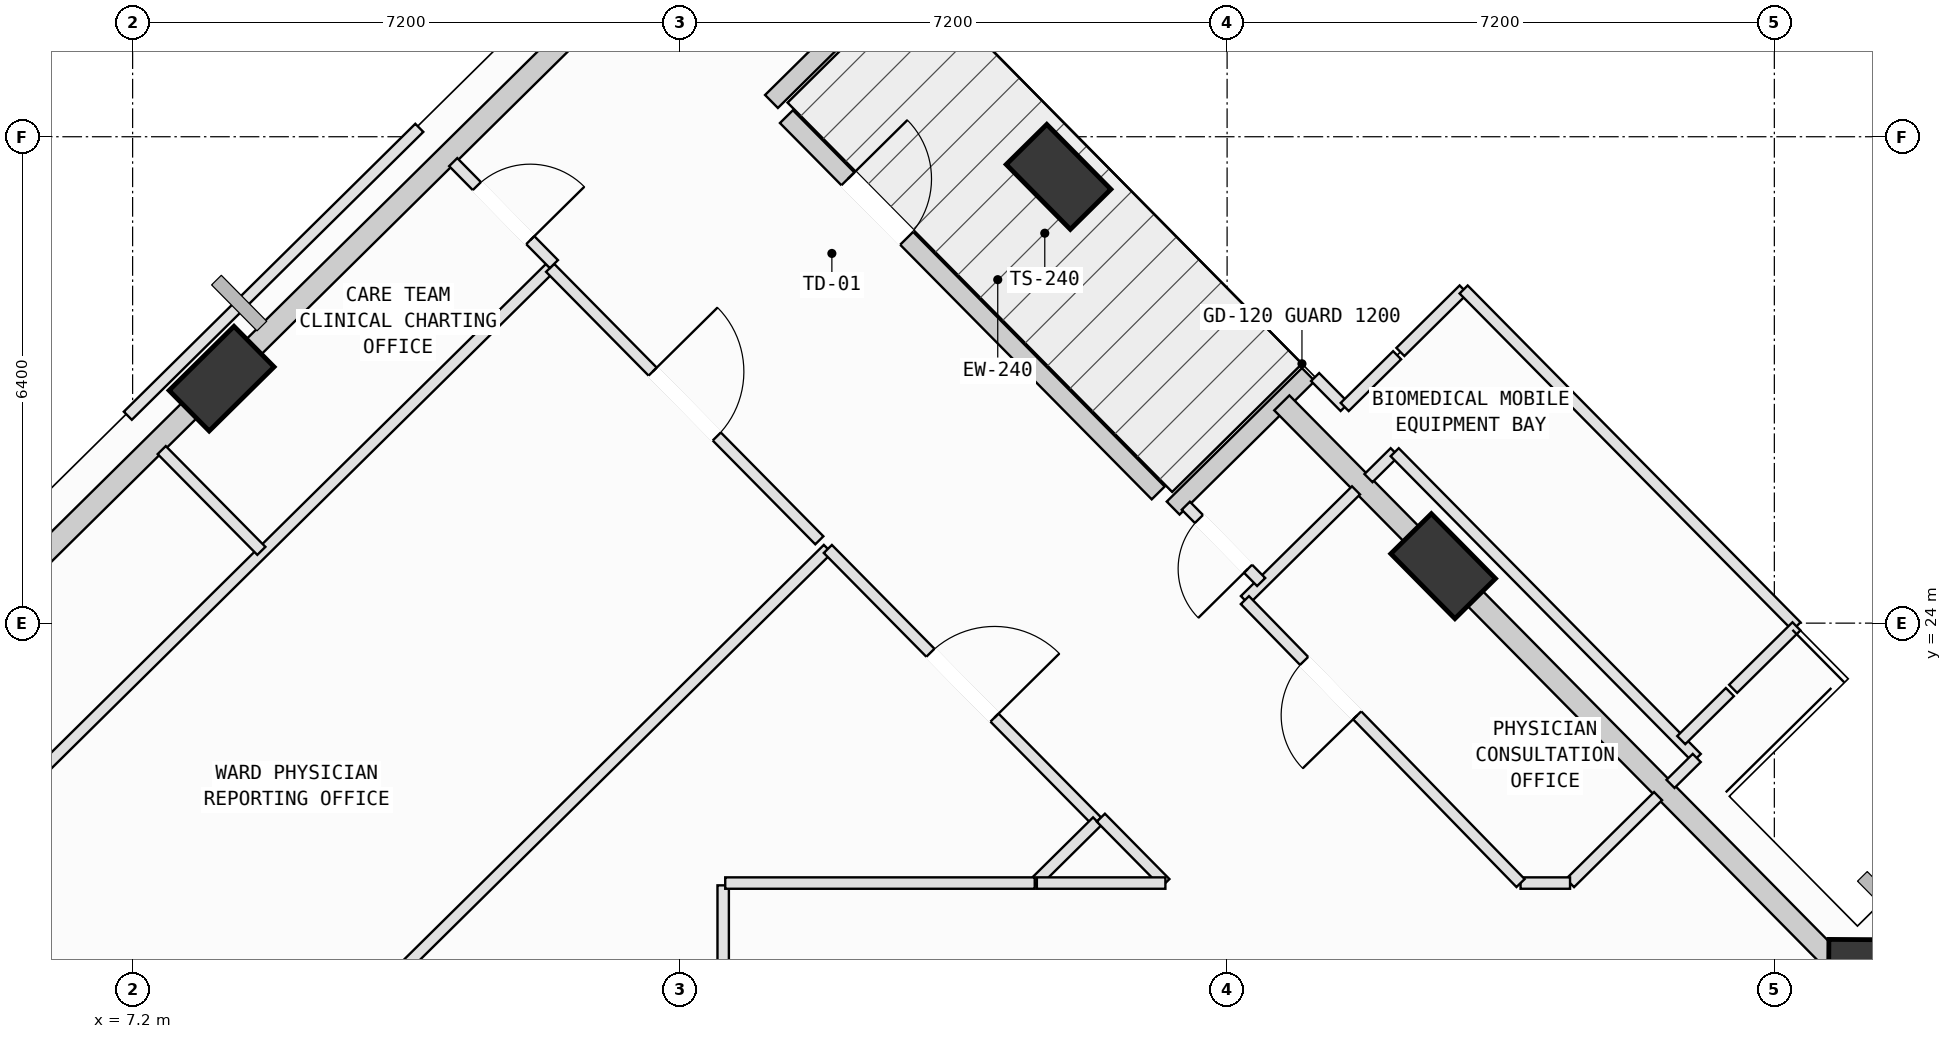
"""IFC4 building model, lengths in metres.
Left out: names, types, materials, properties, quantities, classifications, styles, units other than length and angle.
Written with IfcOpenShell. Run it as: python <this file> out.ifc"""

import sys

from ifc_helpers import new_model, si_unit, direction, frame, frame_2d, origin, origin_2d, place, context, subcontext, project, spatial, rectangle, extrude, element, fill, save


model = new_model("IFC4")
c1 = context("Model", 3, precision=1e-05, world=origin(), true_north=direction((0.0, 1.0)))
c2 = subcontext(c1, "Body", "Model", "MODEL_VIEW")
j1 = project(units=[si_unit("LENGTHUNIT", "METRE"), si_unit("PLANEANGLEUNIT", "RADIAN")], contexts=[c1])
p1 = place(None, origin())
s1 = spatial("IfcSite", under=j1, at=p1, CompositionType="ELEMENT")
p2 = place(p1, origin())
s2 = spatial("IfcBuilding", under=s1, at=p2, CompositionType="ELEMENT")
p3 = place(p2, frame((0.0, 0.0, 215.2)))
s3 = spatial("IfcBuildingStorey", under=s2, at=p3, CompositionType="ELEMENT", Elevation=215.2)
p4 = place(p3, frame((29.889, 19.236, 0.002), z_axis=(0.023205698391, -0.015144771581, 0.999615991997), x_axis=(-0.83375940471, 0.551432149195, 0.027709924051)))
e1 = element("IfcColumn", 1, at=p4, inside=s3, PredefinedType="COLUMN", context=c2, shape_type="SweptSolid", body=[
    extrude(rectangle(XDim=1.2, YDim=0.75, at=origin_2d()), origin(), (0.0, 0.0, 1.0), 3.998),
])
p5 = place(p3, frame((24.442, 24.75, 0.002), z_axis=(0.000549424458, -0.037910287634, 0.999280995628), x_axis=(-0.713002190579, 0.700642811583, 0.026972704851)))
e2 = element("IfcColumn", 2, at=p5, inside=s3, PredefinedType="COLUMN", context=c2, shape_type="SweptSolid", body=[
    extrude(rectangle(XDim=1.2, YDim=0.75, at=origin_2d()), origin(), (0.0, 0.0, 1.0), 3.999),
])
p6 = place(p3, frame((19.383, 29.872, 0.002), z_axis=(-0.020547526902, -0.058959817551, 0.998048866064), x_axis=(-0.429967743236, 0.90175090549, 0.044418962437)))
e3 = element("IfcColumn", 3, at=p6, inside=s3, PredefinedType="COLUMN", context=c2, shape_type="SweptSolid", body=[
    extrude(rectangle(XDim=1.2, YDim=0.75, at=origin_2d()), origin(), (0.0, 0.0, 1.0), 4.004),
])
p7 = place(p3, frame((8.371, 27.217, 0.002), z_axis=(-0.009113457738, -0.104136443749, 0.994521264716), x_axis=(0.769637431424, 0.634240685776, 0.073464118158)))
e4 = element("IfcColumn", 4, at=p7, inside=s3, PredefinedType="COLUMN", context=c2, shape_type="SweptSolid", body=[
    extrude(rectangle(XDim=1.2, YDim=0.75, at=origin_2d()), origin(), (0.0, 0.0, 1.0), 4.018),
])
p8 = place(p3, frame((15.802, 30.665, 0.0), z_axis=(0.0, 0.0, 1.0), x_axis=(0.702761539953, -0.711425483071, 0.0)))
e5 = element("IfcWall", 5, at=p8, inside=s3, PredefinedType="SOLIDWALL", context=c2, shape_type="SweptSolid", body=[
    extrude(rectangle(XDim=6.96, YDim=0.24, at=frame_2d((3.48, 0.0))), origin(), (0.0, 0.0, 1.0), 3.265),
])
p9 = place(p8, frame((1.151, 0.0, 0.0)))
e6 = element("IfcOpeningElement", 6, at=p9, cuts=e5, PredefinedType="OPENING", context=c2, shape_type="SweptSolid", body=[
    extrude(rectangle(XDim=1.1, YDim=2.15, at=frame_2d((0.55, 1.075))), frame((0.0, 0.13, 0.0), z_axis=(0.0, -1.0, 0.0), x_axis=(1.0, 0.0, 0.0)), (0.0, 0.0, 1.0), 0.26),
])
p10 = place(p3, frame((20.89, 25.514, 0.0), z_axis=(0.0, 0.0, 1.0), x_axis=(0.71139038819, 0.702797065725, 0.0)))
e7 = element("IfcWall", 7, at=p10, inside=s3, PredefinedType="SOLIDWALL", context=c2, shape_type="SweptSolid", body=[
    extrude(rectangle(XDim=2.5, YDim=0.24, at=frame_2d((1.25, 0.0))), origin(), (0.0, 0.0, 1.0), 3.265),
])
p11 = place(p3, frame((17.384, 32.621, 0.0), z_axis=(0.0, 0.0, 1.0), x_axis=(-0.711439211914, -0.702747641583, 0.0)))
e8 = element("IfcWall", 8, at=p11, inside=s3, PredefinedType="SOLIDWALL", context=c2, shape_type="SweptSolid", body=[
    extrude(rectangle(XDim=2.5, YDim=0.24, at=frame_2d((1.25, 0.0))), origin(), (0.0, 0.0, 1.0), 3.265),
])
p12 = place(p3, frame((30.177, 19.521, 0.0), z_axis=(0.0, 0.0, 1.0), x_axis=(0.711415033641, 0.702772118051, 0.0)))
e9 = element("IfcWall", 9, at=p12, inside=s3, PredefinedType="SOLIDWALL", context=c2, shape_type="SweptSolid", body=[
    extrude(rectangle(XDim=6.158, YDim=0.28, at=frame_2d((3.079, 0.0))), origin(), (0.0, 0.0, 1.0), 3.165),
])
p13 = place(p12, frame((3.587, 0.0, 0.75)))
e10 = element("IfcOpeningElement", 10, at=p13, cuts=e9, PredefinedType="OPENING", context=c2, shape_type="SweptSolid", body=[
    extrude(rectangle(XDim=1.4, YDim=1.85, at=frame_2d((0.7, 0.925))), frame((0.0, 0.15, 0.0), z_axis=(0.0, -1.0, 0.0), x_axis=(1.0, 0.0, 0.0)), (0.0, 0.0, 1.0), 0.3),
])
p14 = place(p3, frame((24.758, 24.431, 0.0), z_axis=(0.0, 0.0, 1.0), x_axis=(0.702777784816, -0.711409435676, 0.0)))
e11 = element("IfcWall", 11, at=p14, inside=s3, PredefinedType="SOLIDWALL", context=c2, shape_type="SweptSolid", body=[
    extrude(rectangle(XDim=6.958, YDim=0.28, at=frame_2d((3.479, 0.0))), origin(), (0.0, 0.0, 1.0), 3.245),
])
p15 = place(p3, frame((22.32, 26.898, 0.0), z_axis=(0.0, 0.0, 1.0), x_axis=(0.702813375799, -0.711374274765, 0.0)))
e12 = element("IfcWall", 12, at=p15, inside=s3, PredefinedType="SOLIDWALL", context=c2, shape_type="SweptSolid", body=[
    extrude(rectangle(XDim=2.681, YDim=0.28, at=frame_2d((1.34, 0.0))), origin(), (0.0, 0.0, 1.0), 3.245),
])
p16 = place(p3, frame((8.522, 27.367, 0.0), z_axis=(0.0, 0.0, 1.0), x_axis=(0.711412048905, 0.702775139481, 0.0)))
e13 = element("IfcWall", 13, at=p16, inside=s3, PredefinedType="SOLIDWALL", context=c2, shape_type="SweptSolid", body=[
    extrude(rectangle(XDim=7.434, YDim=0.28, at=frame_2d((3.717, 0.0))), origin(), (0.0, 0.0, 1.0), 3.265),
])
p17 = place(p3, frame((2.666, 21.582, 0.0), z_axis=(0.0, 0.0, 1.0), x_axis=(0.711415560766, 0.702771584443, 0.0)))
e14 = element("IfcWall", 14, at=p17, inside=s3, PredefinedType="SOLIDWALL", context=c2, shape_type="SweptSolid", body=[
    extrude(rectangle(XDim=7.485, YDim=0.28, at=frame_2d((3.742, 0.0))), origin(), (0.0, 0.0, 1.0), 3.265),
])
p18 = place(p3, frame((14.97, 20.55, 0.0), z_axis=(0.0, 0.0, 1.0), x_axis=(0.0, -1.0, 0.0)))
e15 = element("IfcWall", 15, at=p18, inside=s3, PredefinedType="PARTITIONING", context=c2, shape_type="SweptSolid", body=[
    extrude(rectangle(XDim=2.32, YDim=0.15, at=frame_2d((1.16, 0.0))), origin(), (0.0, 0.0, 1.0), 3.78),
])
p19 = place(p3, frame((5.544, 14.305, 0.0), z_axis=(0.0, 0.0, 1.0), x_axis=(0.711434510245, 0.702752401371, 0.0)))
e16 = element("IfcWall", 16, at=p19, inside=s3, PredefinedType="PARTITIONING", context=c2, shape_type="SweptSolid", body=[
    extrude(rectangle(XDim=15.185, YDim=0.15, at=frame_2d((7.592, 0.0))), origin(), (0.0, 0.0, 1.0), 3.78),
])
p20 = place(p3, frame((16.347, 24.976, 0.0), z_axis=(0.0, 0.0, 1.0), x_axis=(0.702830826081, -0.711357034062, 0.0)))
e17 = element("IfcWall", 17, at=p20, inside=s3, PredefinedType="PARTITIONING", context=c2, shape_type="SweptSolid", body=[
    extrude(rectangle(XDim=5.04, YDim=0.15, at=frame_2d((2.52, 0.0))), origin(), (0.0, 0.0, 1.0), 3.78),
])
p21 = place(p20, frame((1.92, 0.0, 0.0)))
e18 = element("IfcOpeningElement", 18, at=p21, cuts=e17, PredefinedType="OPENING", context=c2, shape_type="SweptSolid", body=[
    extrude(rectangle(XDim=1.2, YDim=2.15, at=frame_2d((0.6, 1.075))), frame((0.0, 0.085, 0.0), z_axis=(0.0, -1.0, 0.0), x_axis=(1.0, 0.0, 0.0)), (0.0, 0.0, 1.0), 0.17),
])
p22 = place(p3, frame((19.889, 21.391, 0.0), z_axis=(0.0, 0.0, 1.0), x_axis=(-0.710907212679, -0.703285813138, 0.0)))
e19 = element("IfcWall", 19, at=p22, inside=s3, PredefinedType="PARTITIONING", context=c2, shape_type="SweptSolid", body=[
    extrude(rectangle(XDim=1.153, YDim=0.15, at=frame_2d((0.577, 0.0))), origin(), (0.0, 0.0, 1.0), 3.78),
])
p23 = place(p3, frame((19.069, 20.58, 0.0), z_axis=(0.0, 0.0, 1.0), x_axis=(-1.0, 0.0, 0.0)))
e20 = element("IfcWall", 20, at=p23, inside=s3, PredefinedType="PARTITIONING", context=c2, shape_type="SweptSolid", body=[
    extrude(rectangle(XDim=4.072, YDim=0.15, at=frame_2d((2.036, 0.0))), origin(), (0.0, 0.0, 1.0), 3.78),
])
p24 = place(p3, frame((3.038, 19.138, 0.0), z_axis=(0.0, 0.0, 1.0), x_axis=(0.71143794273, 0.702748926462, 0.0)))
e21 = element("IfcWall", 21, at=p24, inside=s3, PredefinedType="PARTITIONING", context=c2, shape_type="SweptSolid", body=[
    extrude(rectangle(XDim=13.571, YDim=0.15, at=frame_2d((6.786, 0.0))), origin(), (0.0, 0.0, 1.0), 3.78),
])
p25 = place(p3, frame((12.693, 28.675, 0.0), z_axis=(0.0, 0.0, 1.0), x_axis=(0.702830826081, -0.711357034062, 0.0)))
e22 = element("IfcWall", 22, at=p25, inside=s3, PredefinedType="PARTITIONING", context=c2, shape_type="SweptSolid", body=[
    extrude(rectangle(XDim=5.04, YDim=0.15, at=frame_2d((2.52, 0.0))), origin(), (0.0, 0.0, 1.0), 3.78),
])
p26 = place(p25, frame((1.92, 0.0, 0.0)))
e23 = element("IfcOpeningElement", 23, at=p26, cuts=e22, PredefinedType="OPENING", context=c2, shape_type="SweptSolid", body=[
    extrude(rectangle(XDim=1.2, YDim=2.15, at=frame_2d((0.6, 1.075))), frame((0.0, 0.085, 0.0), z_axis=(0.0, -1.0, 0.0), x_axis=(1.0, 0.0, 0.0)), (0.0, 0.0, 1.0), 0.17),
])
p27 = place(p3, frame((21.834, 24.303, 0.0), z_axis=(0.0, 0.0, 1.0), x_axis=(0.711430022563, 0.702756944466, 0.0)))
e24 = element("IfcWall", 24, at=p27, inside=s3, PredefinedType="PARTITIONING", context=c2, shape_type="SweptSolid", body=[
    extrude(rectangle(XDim=2.055, YDim=0.15, at=frame_2d((1.027, 0.0))), origin(), (0.0, 0.0, 1.0), 3.78),
])
p28 = place(p3, frame((23.46, 25.908, 0.0), z_axis=(0.0, 0.0, 1.0), x_axis=(0.711121484403, 0.70306915337, 0.0)))
e25 = element("IfcWall", 25, at=p28, inside=s3, PredefinedType="PARTITIONING", context=c2, shape_type="SweptSolid", body=[
    extrude(rectangle(XDim=0.485, YDim=0.15, at=frame_2d((0.243, 0.0))), origin(), (0.0, 0.0, 1.0), 3.78),
])
p29 = place(p3, frame((23.805, 26.249, 0.0), z_axis=(0.0, 0.0, 1.0), x_axis=(0.702776263114, -0.711410938911, 0.0)))
e26 = element("IfcWall", 26, at=p29, inside=s3, PredefinedType="PARTITIONING", context=c2, shape_type="SweptSolid", body=[
    extrude(rectangle(XDim=5.655, YDim=0.15, at=frame_2d((2.827, 0.0))), origin(), (0.0, 0.0, 1.0), 3.78),
])
p30 = place(p3, frame((27.779, 22.226, 0.0), z_axis=(0.0, 0.0, 1.0), x_axis=(-0.711121484403, -0.70306915337, 0.0)))
e27 = element("IfcWall", 27, at=p30, inside=s3, PredefinedType="PARTITIONING", context=c2, shape_type="SweptSolid", body=[
    extrude(rectangle(XDim=0.485, YDim=0.15, at=frame_2d((0.243, 0.0))), origin(), (0.0, 0.0, 1.0), 3.78),
])
p31 = place(p3, frame((27.27, 21.724, 0.0), z_axis=(0.0, 0.0, 1.0), x_axis=(-0.711368370717, -0.702819351714, 0.0)))
e28 = element("IfcWall", 28, at=p31, inside=s3, PredefinedType="PARTITIONING", context=c2, shape_type="SweptSolid", body=[
    extrude(rectangle(XDim=1.628, YDim=0.15, at=frame_2d((0.814, 0.0))), origin(), (0.0, 0.0, 1.0), 3.78),
])
p32 = place(p3, frame((26.112, 20.58, 0.0), z_axis=(0.0, 0.0, 1.0), x_axis=(-1.0, 0.0, 0.0)))
e29 = element("IfcWall", 29, at=p32, inside=s3, PredefinedType="PARTITIONING", context=c2, shape_type="SweptSolid", body=[
    extrude(rectangle(XDim=0.651, YDim=0.15, at=frame_2d((0.326, 0.0))), origin(), (0.0, 0.0, 1.0), 3.78),
])
p33 = place(p3, frame((25.461, 20.58, 0.0), z_axis=(0.0, 0.0, 1.0), x_axis=(-0.69781653345, 0.716276542715, 0.0)))
e30 = element("IfcWall", 30, at=p33, inside=s3, PredefinedType="PARTITIONING", context=c2, shape_type="SweptSolid", body=[
    extrude(rectangle(XDim=5.198, YDim=0.15, at=frame_2d((2.599, 0.0))), origin(), (0.0, 0.0, 1.0), 3.78),
])
p34 = place(p33, frame((3.081, 0.0, 0.0)))
e31 = element("IfcOpeningElement", 31, at=p34, cuts=e30, PredefinedType="OPENING", context=c2, shape_type="SweptSolid", body=[
    extrude(rectangle(XDim=1.0, YDim=2.12, at=frame_2d((0.5, 1.06))), frame((0.0, 0.085, 0.0), z_axis=(0.0, -1.0, 0.0), x_axis=(1.0, 0.0, 0.0)), (0.0, 0.0, 1.0), 0.17),
])
p35 = place(p3, frame((11.418, 30.066, 0.0), z_axis=(0.0, 0.0, 1.0), x_axis=(0.702626007323, -0.711559339643, 0.0)))
e32 = element("IfcWall", 32, at=p35, inside=s3, PredefinedType="PARTITIONING", context=c2, shape_type="SweptSolid", body=[
    extrude(rectangle(XDim=1.886, YDim=0.15, at=frame_2d((0.943, 0.0))), origin(), (0.0, 0.0, 1.0), 3.78),
])
p36 = place(p35, frame((0.443, 0.0, 0.0)))
e33 = element("IfcOpeningElement", 33, at=p36, cuts=e32, PredefinedType="OPENING", context=c2, shape_type="SweptSolid", body=[
    extrude(rectangle(XDim=1.0, YDim=2.12, at=frame_2d((0.5, 1.06))), frame((0.0, 0.085, 0.0), z_axis=(0.0, -1.0, 0.0), x_axis=(1.0, 0.0, 0.0)), (0.0, 0.0, 1.0), 0.17),
])
p37 = place(p3, frame((19.939, 21.44, 0.0), z_axis=(0.0, 0.0, 1.0), x_axis=(0.70264822924, -0.711537396028, 0.0)))
e34 = element("IfcWall", 34, at=p37, inside=s3, PredefinedType="PARTITIONING", context=c2, shape_type="SweptSolid", body=[
    extrude(rectangle(XDim=1.208, YDim=0.15, at=frame_2d((0.604, 0.0))), origin(), (0.0, 0.0, 1.0), 3.78),
])
p38 = place(p3, frame((20.788, 20.58, 0.0), z_axis=(0.0, 0.0, 1.0), x_axis=(-1.0, 0.0, 0.0)))
e35 = element("IfcWall", 35, at=p38, inside=s3, PredefinedType="PARTITIONING", context=c2, shape_type="SweptSolid", body=[
    extrude(rectangle(XDim=1.691, YDim=0.15, at=frame_2d((0.846, 0.0))), origin(), (0.0, 0.0, 1.0), 3.78),
])
p39 = place(p3, frame((8.894, 24.951, 0.0), z_axis=(0.0, 0.0, 1.0), x_axis=(-0.703036635776, 0.711153632316, 0.0)))
e36 = element("IfcWall", 36, at=p39, inside=s3, PredefinedType="PARTITIONING", context=c2, shape_type="SweptSolid", body=[
    extrude(rectangle(XDim=1.865, YDim=0.15, at=frame_2d((0.932, 0.0))), origin(), (0.0, 0.0, 1.0), 3.78),
])
p40 = place(p3, frame((7.137, 26.729, 0.0), z_axis=(0.0, 0.0, 1.0), x_axis=(0.711441412602, 0.70274541367, 0.0)))
e37 = element("IfcWall", 37, at=p40, inside=s3, PredefinedType="PARTITIONING", context=c2, shape_type="SweptSolid", body=[
    extrude(rectangle(XDim=5.39, YDim=0.15, at=frame_2d((2.695, 0.0))), origin(), (0.0, 0.0, 1.0), 3.78),
])
p41 = place(p3, frame((22.048, 24.541, 0.0), z_axis=(0.0, 0.0, 1.0), x_axis=(-0.702593101483, 0.711591830861, 0.0)))
e38 = element("IfcWall", 38, at=p41, inside=s3, PredefinedType="PARTITIONING", context=c2, shape_type="SweptSolid", body=[
    extrude(rectangle(XDim=1.411, YDim=0.15, at=frame_2d((0.706, 0.0))), origin(), (0.0, 0.0, 1.0), 3.78),
])
p42 = place(p41, frame((0.245, 0.0, 0.0)))
e39 = element("IfcOpeningElement", 39, at=p42, cuts=e38, PredefinedType="OPENING", context=c2, shape_type="SweptSolid", body=[
    extrude(rectangle(XDim=0.92, YDim=2.1, at=frame_2d((0.46, 1.05))), frame((0.0, 0.085, 0.0), z_axis=(0.0, -1.0, 0.0), x_axis=(1.0, 0.0, 0.0)), (0.0, 0.0, 1.0), 0.17),
])
p43 = place(p3, frame((22.758, 27.238, 0.0), z_axis=(0.0, 0.0, 1.0), x_axis=(0.702461461505, -0.71172178209, 0.0)))
e40 = element("IfcWall", 40, at=p43, inside=s3, PredefinedType="PARTITIONING", context=c2, shape_type="SweptSolid", body=[
    extrude(rectangle(XDim=0.554, YDim=0.15, at=frame_2d((0.277, 0.0))), origin(), (0.0, 0.0, 1.0), 3.78),
])
p44 = place(p3, frame((23.147, 26.844, 0.0), z_axis=(0.0, 0.0, 1.0), x_axis=(0.711750803525, 0.702432056274, 0.0)))
e41 = element("IfcWall", 41, at=p44, inside=s3, PredefinedType="PARTITIONING", context=c2, shape_type="SweptSolid", body=[
    extrude(rectangle(XDim=0.969, YDim=0.15, at=frame_2d((0.485, 0.0))), origin(), (0.0, 0.0, 1.0), 3.78),
])
p45 = place(p3, frame((28.215, 23.093, 0.0), z_axis=(0.0, 0.0, 1.0), x_axis=(-0.711570448846, -0.702614756698, 0.0)))
e42 = element("IfcWall", 42, at=p45, inside=s3, PredefinedType="PARTITIONING", context=c2, shape_type="SweptSolid", body=[
    extrude(rectangle(XDim=0.9, YDim=0.15, at=frame_2d((0.45, 0.0))), origin(), (0.0, 0.0, 1.0), 3.78),
])
p46 = place(p3, frame((23.88, 27.568, 0.0), z_axis=(0.0, 0.0, 1.0), x_axis=(0.711477293249, 0.70270908717, 0.0)))
e43 = element("IfcWall", 43, at=p46, inside=s3, PredefinedType="PARTITIONING", context=c2, shape_type="SweptSolid", body=[
    extrude(rectangle(XDim=1.169, YDim=0.15, at=frame_2d((0.585, 0.0))), origin(), (0.0, 0.0, 1.0), 3.78),
])
p47 = place(p3, frame((24.712, 28.39, 0.0), z_axis=(0.0, 0.0, 1.0), x_axis=(0.702862132266, -0.711326101747, 0.0)))
e44 = element("IfcWall", 44, at=p47, inside=s3, PredefinedType="PARTITIONING", context=c2, shape_type="SweptSolid", body=[
    extrude(rectangle(XDim=6.23, YDim=0.15, at=frame_2d((3.115, 0.0))), origin(), (0.0, 0.0, 1.0), 3.78),
])
p48 = place(p3, frame((29.091, 23.958, 0.0), z_axis=(0.0, 0.0, 1.0), x_axis=(-0.711784977871, -0.702397426873, 0.0)))
e45 = element("IfcWall", 45, at=p48, inside=s3, PredefinedType="PARTITIONING", context=c2, shape_type="SweptSolid", body=[
    extrude(rectangle(XDim=1.17, YDim=0.15, at=frame_2d((0.585, 0.0))), origin(), (0.0, 0.0, 1.0), 3.78),
])
p49 = place(p9, origin())
e46 = element("IfcDoor", 46, at=p49, inside=s3, OperationType="SINGLE_SWING_LEFT", PredefinedType="DOOR", context=c2, shape_type="SweptSolid", body=[
    extrude(rectangle(XDim=1.1, YDim=2.15, at=frame_2d((0.55, 1.075))), frame((0.0, 0.025, 0.0), z_axis=(0.0, -1.0, 0.0), x_axis=(1.0, 0.0, 0.0)), (0.0, 0.0, 1.0), 0.05),
])
fill(e6, e46)
p50 = place(p21, origin())
e47 = element("IfcDoor", 47, at=p50, inside=s3, OperationType="SINGLE_SWING_RIGHT", PredefinedType="DOOR", context=c2, shape_type="SweptSolid", body=[
    extrude(rectangle(XDim=1.2, YDim=2.15, at=frame_2d((0.6, 1.075))), frame((0.0, 0.025, 0.0), z_axis=(0.0, -1.0, 0.0), x_axis=(1.0, 0.0, 0.0)), (0.0, 0.0, 1.0), 0.05),
])
fill(e18, e47)
p51 = place(p26, origin())
e48 = element("IfcDoor", 48, at=p51, inside=s3, OperationType="SINGLE_SWING_LEFT", PredefinedType="DOOR", context=c2, shape_type="SweptSolid", body=[
    extrude(rectangle(XDim=1.2, YDim=2.15, at=frame_2d((0.6, 1.075))), frame((0.0, 0.025, 0.0), z_axis=(0.0, -1.0, 0.0), x_axis=(1.0, 0.0, 0.0)), (0.0, 0.0, 1.0), 0.05),
])
fill(e23, e48)
p52 = place(p34, origin())
e49 = element("IfcDoor", 49, at=p52, inside=s3, OperationType="SINGLE_SWING_LEFT", PredefinedType="DOOR", context=c2, shape_type="SweptSolid", body=[
    extrude(rectangle(XDim=1.0, YDim=2.12, at=frame_2d((0.5, 1.06))), frame((0.0, 0.025, 0.0), z_axis=(0.0, -1.0, 0.0), x_axis=(1.0, 0.0, 0.0)), (0.0, 0.0, 1.0), 0.05),
])
fill(e31, e49)
p53 = place(p36, origin())
e50 = element("IfcDoor", 50, at=p53, inside=s3, OperationType="SINGLE_SWING_RIGHT", PredefinedType="DOOR", context=c2, shape_type="SweptSolid", body=[
    extrude(rectangle(XDim=1.0, YDim=2.12, at=frame_2d((0.5, 1.06))), frame((0.0, 0.025, 0.0), z_axis=(0.0, -1.0, 0.0), x_axis=(1.0, 0.0, 0.0)), (0.0, 0.0, 1.0), 0.05),
])
fill(e33, e50)
p54 = place(p42, origin())
e51 = element("IfcDoor", 51, at=p54, inside=s3, OperationType="SINGLE_SWING_LEFT", PredefinedType="DOOR", context=c2, shape_type="SweptSolid", body=[
    extrude(rectangle(XDim=0.92, YDim=2.1, at=frame_2d((0.46, 1.05))), frame((0.0, 0.025, 0.0), z_axis=(0.0, -1.0, 0.0), x_axis=(1.0, 0.0, 0.0)), (0.0, 0.0, 1.0), 0.05),
])
fill(e39, e51)
save(model, sys.argv[1])
